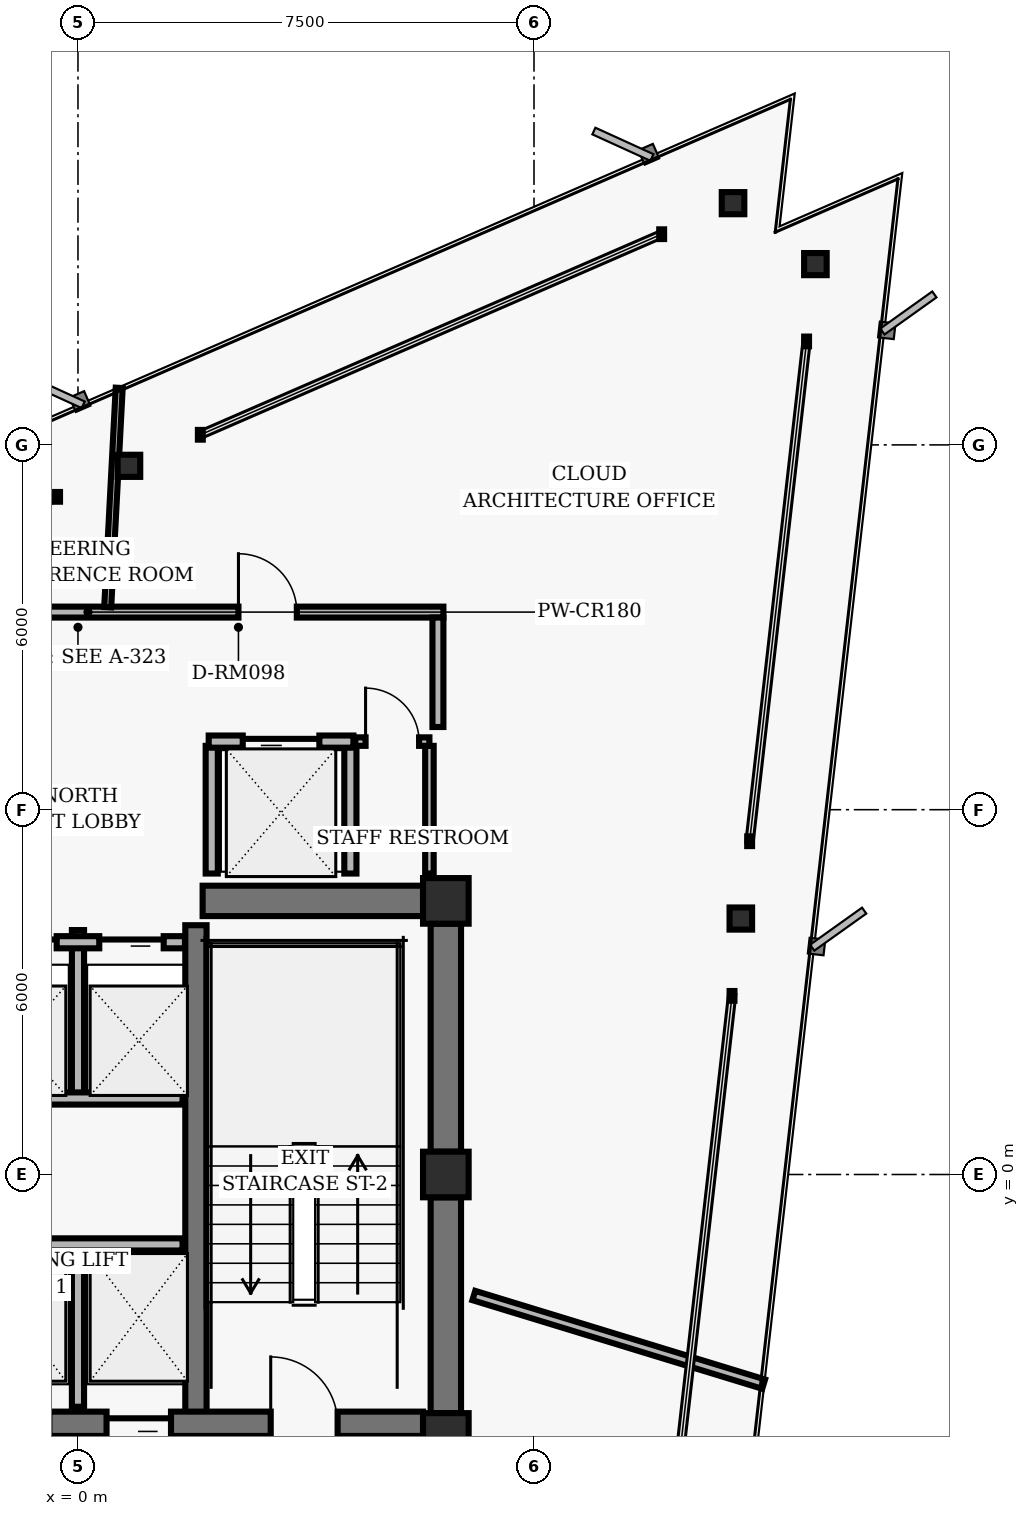
"""IFC4 building model, lengths in metres.
Left out: names, types, materials, properties, quantities, classifications, styles, units other than length and angle.
Written with IfcOpenShell. Run it as: python <this file> out.ifc"""

import sys

from ifc_helpers import new_model, si_unit, direction, frame, frame_2d, origin, origin_2d, place, context, subcontext, project, spatial, rectangle, hollow_rectangle, i_section, extrude, element, fill, save


model = new_model("IFC4")
c1 = context("Model", 3, precision=1e-05, world=origin(), true_north=direction((0.0, 1.0)))
c2 = subcontext(c1, "Body", "Model", "MODEL_VIEW")
j1 = project(units=[si_unit("LENGTHUNIT", "METRE"), si_unit("PLANEANGLEUNIT", "RADIAN")], contexts=[c1])
p1 = place(None, origin())
s1 = spatial("IfcSite", under=j1, at=p1, CompositionType="ELEMENT")
p2 = place(p1, origin())
s2 = spatial("IfcBuilding", under=s1, at=p2, CompositionType="ELEMENT")
p3 = place(p2, frame((0.0, 0.0, 230.08)))
s3 = spatial("IfcBuildingStorey", under=s2, at=p3, CompositionType="ELEMENT", Elevation=230.08)
for number, where, z_axis, x_axis in (
    (1, (6.05, 4.5, 0.0), (0.0, 0.0, 1.0), (1.0, 0.0, 0.0)),
    (2, (6.05, 0.0, 0.0), (0.0, 0.0, 1.0), (1.0, 0.0, 0.0)),
    (3, (6.05, -4.3, 0.0), (0.0, 0.0, 1.0), (1.0, 0.0, 0.0)),
):
    element("IfcColumn", number, at=place(p3, frame(where, z_axis=z_axis, x_axis=x_axis)), inside=s3, PredefinedType="COLUMN", context=c2, shape_type="SweptSolid", body=[
        extrude(hollow_rectangle(XDim=0.75, YDim=0.75, WallThickness=0.05, InnerFilletRadius=0.02, OuterFilletRadius=0.04, at=origin_2d()), origin(), (0.0, 0.0, 1.0), 3.04),
    ])
p4 = place(p3, frame((6.05, 0.375, 0.0), z_axis=(0.0, 0.0, 1.0), x_axis=(0.0, 1.0, 0.0)))
e4 = element("IfcWall", 4, at=p4, inside=s3, PredefinedType="SHEAR", context=c2, shape_type="SweptSolid", body=[
    extrude(rectangle(XDim=3.75, YDim=0.5, at=frame_2d((1.875, 0.0))), origin(), (0.0, 0.0, 1.0), 2.798),
])
p5 = place(p3, frame((6.05, -3.925, 0.0), z_axis=(0.0, 0.0, 1.0), x_axis=(0.0, 1.0, 0.0)))
e5 = element("IfcWall", 5, at=p5, inside=s3, PredefinedType="SHEAR", context=c2, shape_type="SweptSolid", body=[
    extrude(rectangle(XDim=3.55, YDim=0.5, at=frame_2d((1.775, 0.0))), origin(), (0.0, 0.0, 1.0), 2.798),
])
p6 = place(p3, frame((1.94, -4.1, 0.0), z_axis=(0.0, 0.0, 1.0), x_axis=(0.0, 1.0, 0.0)))
e6 = element("IfcWall", 6, at=p6, inside=s3, PredefinedType="SHEAR", context=c2, shape_type="SweptSolid", body=[
    extrude(rectangle(XDim=8.2, YDim=0.35, at=frame_2d((4.1, 0.0))), origin(), (0.0, 0.0, 1.0), 2.798),
])
p7 = place(p3, frame((-5.675, -4.1, 0.0), z_axis=(0.0, 0.0, 1.0), x_axis=(1.0, 0.0, 0.0)))
e7 = element("IfcWall", 7, at=p7, inside=s3, PredefinedType="SHEAR", context=c2, shape_type="SweptSolid", body=[
    extrude(rectangle(XDim=11.35, YDim=0.4, at=frame_2d((5.675, 0.0))), origin(), (0.0, 0.0, 1.0), 2.798),
])
p8 = place(p7, frame((1.405, 0.0, 0.0)))
e8 = element("IfcOpeningElement", 8, at=p8, cuts=e7, PredefinedType="OPENING", context=c2, shape_type="SweptSolid", body=[
    extrude(rectangle(XDim=1.1, YDim=2.04, at=frame_2d((0.55, 1.02))), frame((0.0, 0.21, 0.0), z_axis=(0.0, -1.0, 0.0), x_axis=(1.0, 0.0, 0.0)), (0.0, 0.0, 1.0), 0.42),
])
p9 = place(p7, frame((8.845, 0.0, 0.0)))
e9 = element("IfcOpeningElement", 9, at=p9, cuts=e7, PredefinedType="OPENING", context=c2, shape_type="SweptSolid", body=[
    extrude(rectangle(XDim=1.1, YDim=2.04, at=frame_2d((0.55, 1.02))), frame((0.0, 0.21, 0.0), z_axis=(0.0, -1.0, 0.0), x_axis=(1.0, 0.0, 0.0)), (0.0, 0.0, 1.0), 0.42),
])
p10 = place(p7, frame((4.145, 0.0, 0.0)))
e10 = element("IfcOpeningElement", 10, at=p10, cuts=e7, PredefinedType="OPENING", context=c2, shape_type="SweptSolid", body=[
    extrude(rectangle(XDim=1.06, YDim=2.04, at=frame_2d((0.53, 1.02))), frame((0.0, 0.21, 0.0), z_axis=(0.0, -1.0, 0.0), x_axis=(1.0, 0.0, 0.0)), (0.0, 0.0, 1.0), 0.42),
])
p11 = place(p7, frame((6.145, 0.0, 0.0)))
e11 = element("IfcOpeningElement", 11, at=p11, cuts=e7, PredefinedType="OPENING", context=c2, shape_type="SweptSolid", body=[
    extrude(rectangle(XDim=1.06, YDim=2.04, at=frame_2d((0.53, 1.02))), frame((0.0, 0.21, 0.0), z_axis=(0.0, -1.0, 0.0), x_axis=(1.0, 0.0, 0.0)), (0.0, 0.0, 1.0), 0.42),
])
p12 = place(p3, frame((2.05, 4.5, 0.0), z_axis=(0.0, 0.0, 1.0), x_axis=(1.0, 0.0, 0.0)))
e12 = element("IfcWall", 12, at=p12, inside=s3, PredefinedType="SHEAR", context=c2, shape_type="SweptSolid", body=[
    extrude(rectangle(XDim=3.625, YDim=0.5, at=frame_2d((1.812, 0.0))), origin(), (0.0, 0.0, 1.0), 2.798),
])
for number, where, z_axis, x_axis in (
    (13, (10.901, 4.21, 0.0), (0.0, 0.0, 1.0), (1.0, 0.0, 0.0)),
    (14, (12.128, 14.973, 0.0), (0.0, 0.0, 1.0), (1.0, 0.0, 0.0)),
    (15, (10.773, 15.976, 0.0), (0.0, 0.0, 1.0), (1.0, 0.0, 0.0)),
    (16, (0.838, 11.656, 0.0), (0.0, 0.0, 1.0), (1.0, 0.0, 0.0)),
):
    element("IfcColumn", number, at=place(p3, frame(where, z_axis=z_axis, x_axis=x_axis)), inside=s3, PredefinedType="COLUMN", context=c2, shape_type="SweptSolid", body=[
        extrude(i_section(OverallWidth=0.371, OverallDepth=0.364, WebThickness=0.013, FlangeThickness=0.022, FilletRadius=0.015, at=origin_2d()), origin(), (0.0, 0.0, 1.0), 3.04),
    ])
p13 = place(p3, frame((0.0, -3.82, 0.0), z_axis=(0.0, 0.0, 1.0), x_axis=(0.0, 1.0, 0.0)))
e17 = element("IfcWall", 17, at=p13, inside=s3, PredefinedType="PARTITIONING", context=c2, shape_type="SweptSolid", body=[
    extrude(rectangle(XDim=2.67, YDim=0.2, at=frame_2d((1.335, 0.0))), origin(), (0.0, 0.0, 1.0), 2.773),
])
p14 = place(p3, frame((-1.72, -1.15, 0.0), z_axis=(0.0, 0.0, 1.0), x_axis=(1.0, 0.0, 0.0)))
e18 = element("IfcWall", 18, at=p14, inside=s3, PredefinedType="PARTITIONING", context=c2, shape_type="SweptSolid", body=[
    extrude(rectangle(XDim=3.44, YDim=0.2, at=frame_2d((1.72, 0.0))), origin(), (0.0, 0.0, 1.0), 2.773),
])
p15 = place(p3, frame((0.0, 1.25, 0.0), z_axis=(0.0, 0.0, 1.0), x_axis=(0.0, 1.0, 0.0)))
e19 = element("IfcWall", 19, at=p15, inside=s3, PredefinedType="PARTITIONING", context=c2, shape_type="SweptSolid", body=[
    extrude(rectangle(XDim=2.77, YDim=0.2, at=frame_2d((1.385, 0.0))), origin(), (0.0, 0.0, 1.0), 2.773),
])
p16 = place(p3, frame((-1.72, 1.25, 0.0), z_axis=(0.0, 0.0, 1.0), x_axis=(1.0, 0.0, 0.0)))
e20 = element("IfcWall", 20, at=p16, inside=s3, PredefinedType="PARTITIONING", context=c2, shape_type="SweptSolid", body=[
    extrude(rectangle(XDim=3.44, YDim=0.2, at=frame_2d((1.72, 0.0))), origin(), (0.0, 0.0, 1.0), 2.773),
])
p17 = place(p3, frame((-1.76, 3.82, 0.0), z_axis=(0.0, 0.0, 1.0), x_axis=(1.0, 0.0, 0.0)))
e21 = element("IfcWall", 21, at=p17, inside=s3, PredefinedType="PARTITIONING", context=c2, shape_type="SweptSolid", body=[
    extrude(rectangle(XDim=3.52, YDim=0.2, at=frame_2d((1.76, 0.0))), origin(), (0.0, 0.0, 1.0), 2.773),
])
p18 = place(p17, frame((0.35, 0.0, 0.0)))
e22 = element("IfcOpeningElement", 22, at=p18, cuts=e21, PredefinedType="OPENING", context=c2, shape_type="SweptSolid", body=[
    extrude(rectangle(XDim=1.06, YDim=2.04, at=frame_2d((0.53, 1.02))), frame((0.0, 0.11, 0.0), z_axis=(0.0, -1.0, 0.0), x_axis=(1.0, 0.0, 0.0)), (0.0, 0.0, 1.0), 0.22),
])
p19 = place(p17, frame((2.11, 0.0, 0.0)))
e23 = element("IfcOpeningElement", 23, at=p19, cuts=e21, PredefinedType="OPENING", context=c2, shape_type="SweptSolid", body=[
    extrude(rectangle(XDim=1.06, YDim=2.04, at=frame_2d((0.53, 1.02))), frame((0.0, 0.11, 0.0), z_axis=(0.0, -1.0, 0.0), x_axis=(1.0, 0.0, 0.0)), (0.0, 0.0, 1.0), 0.22),
])
for number, where, z_axis, x_axis in (
    (24, (2.2, 4.95, 0.0), (0.0, 0.0, 1.0), (0.0, 1.0, 0.0)),
    (25, (4.48, 4.95, 0.0), (0.0, 0.0, 1.0), (0.0, 1.0, 0.0)),
):
    element("IfcWall", number, at=place(p3, frame(where, z_axis=z_axis, x_axis=x_axis)), inside=s3, PredefinedType="PARTITIONING", context=c2, shape_type="SweptSolid", body=[
        extrude(rectangle(XDim=2.1, YDim=0.2, at=frame_2d((1.05, 0.0))), origin(), (0.0, 0.0, 1.0), 2.773),
    ])
p20 = place(p3, frame((2.15, 7.12, 0.0), z_axis=(0.0, 0.0, 1.0), x_axis=(1.0, 0.0, 0.0)))
e26 = element("IfcWall", 26, at=p20, inside=s3, PredefinedType="PARTITIONING", context=c2, shape_type="SweptSolid", body=[
    extrude(rectangle(XDim=2.38, YDim=0.2, at=frame_2d((1.19, 0.0))), origin(), (0.0, 0.0, 1.0), 2.395),
])
p21 = place(p20, frame((0.56, 0.0, 0.0)))
e27 = element("IfcOpeningElement", 27, at=p21, cuts=e26, PredefinedType="OPENING", context=c2, shape_type="SweptSolid", body=[
    extrude(rectangle(XDim=1.26, YDim=2.06, at=frame_2d((0.63, 1.03))), frame((0.0, 0.11, 0.0), z_axis=(0.0, -1.0, 0.0), x_axis=(1.0, 0.0, 0.0)), (0.0, 0.0, 1.0), 0.22),
])
p22 = place(p3, frame((5.78, 4.95, 0.0), z_axis=(0.0, 0.0, 1.0), x_axis=(0.0, 1.0, 0.0)))
e28 = element("IfcWall", 28, at=p22, inside=s3, PredefinedType="PARTITIONING", context=c2, shape_type="SweptSolid", body=[
    extrude(rectangle(XDim=2.1, YDim=0.14, at=frame_2d((1.05, 0.0))), origin(), (0.0, 0.0, 1.0), 2.773),
])
p23 = place(p3, frame((4.56, 7.12, 0.0), z_axis=(0.0, 0.0, 1.0), x_axis=(1.0, 0.0, 0.0)))
e29 = element("IfcWall", 29, at=p23, inside=s3, PredefinedType="PARTITIONING", context=c2, shape_type="SweptSolid", body=[
    extrude(rectangle(XDim=1.22, YDim=0.14, at=frame_2d((0.61, 0.0))), origin(), (0.0, 0.0, 1.0), 2.773),
])
p24 = place(p23, frame((0.17, 0.0, 0.0)))
e30 = element("IfcOpeningElement", 30, at=p24, cuts=e29, PredefinedType="OPENING", context=c2, shape_type="SweptSolid", body=[
    extrude(rectangle(XDim=0.88, YDim=2.02, at=frame_2d((0.44, 1.01))), frame((0.0, 0.08, 0.0), z_axis=(0.0, -1.0, 0.0), x_axis=(1.0, 0.0, 0.0)), (0.0, 0.0, 1.0), 0.16),
])
p25 = place(p3, frame((-7.29, 9.25, 0.0), z_axis=(0.0, 0.0, 1.0), x_axis=(1.0, 0.0, 0.0)))
e31 = element("IfcWall", 31, at=p25, inside=s3, PredefinedType="PARTITIONING", context=c2, shape_type="SweptSolid", body=[
    extrude(rectangle(XDim=13.3, YDim=0.18, at=frame_2d((6.65, 0.0))), origin(), (0.0, 0.0, 1.0), 2.395),
])
p26 = place(p25, frame((9.929, 0.0, 0.0)))
e32 = element("IfcOpeningElement", 32, at=p26, cuts=e31, PredefinedType="OPENING", context=c2, shape_type="SweptSolid", body=[
    extrude(rectangle(XDim=0.96, YDim=2.02, at=frame_2d((0.48, 1.01))), frame((0.0, 0.1, 0.0), z_axis=(0.0, -1.0, 0.0), x_axis=(1.0, 0.0, 0.0)), (0.0, 0.0, 1.0), 0.2),
])
p27 = place(p25, frame((4.02, 0.0, 0.0)))
e33 = element("IfcOpeningElement", 33, at=p27, cuts=e31, PredefinedType="OPENING", context=c2, shape_type="SweptSolid", body=[
    extrude(rectangle(XDim=0.96, YDim=2.02, at=frame_2d((0.48, 1.01))), frame((0.0, 0.1, 0.0), z_axis=(0.0, -1.0, 0.0), x_axis=(1.0, 0.0, 0.0)), (0.0, 0.0, 1.0), 0.2),
])
p28 = place(p3, frame((5.92, 9.16, 0.0), z_axis=(0.0, 0.0, 1.0), x_axis=(0.0, -1.0, 0.0)))
e34 = element("IfcWall", 34, at=p28, inside=s3, PredefinedType="PARTITIONING", context=c2, shape_type="SweptSolid", body=[
    extrude(rectangle(XDim=1.8, YDim=0.18, at=frame_2d((0.9, 0.0))), origin(), (0.0, 0.0, 1.0), 2.773),
])
p29 = place(p3, frame((6.51, -1.99, 0.0), z_axis=(0.0, 0.0, 1.0), x_axis=(0.956296423481, -0.292398957653, 0.0)))
e35 = element("IfcWall", 35, at=p29, inside=s3, PredefinedType="PARTITIONING", context=c2, shape_type="SweptSolid", body=[
    extrude(rectangle(XDim=4.985, YDim=0.16, at=frame_2d((2.492, 0.0))), origin(), (0.0, 0.0, 1.0), 2.773),
])
p30 = place(p3, frame((0.489, 9.33, 0.0), z_axis=(0.0, 0.0, 1.0), x_axis=(0.05229993373, 0.998631421963, 0.0)))
e36 = element("IfcWall", 36, at=p30, inside=s3, PredefinedType="MOVABLE", context=c2, shape_type="SweptSolid", body=[
    extrude(rectangle(XDim=3.613, YDim=0.115, at=frame_2d((1.807, 0.0))), origin(), (0.0, 0.0, 1.0), 2.773),
])
p31 = place(p9, origin())
e37 = element("IfcDoor", 37, at=p31, inside=s3, OperationType="SINGLE_SWING_LEFT", PredefinedType="DOOR", context=c2, shape_type="SweptSolid", body=[
    extrude(rectangle(XDim=1.1, YDim=2.04, at=frame_2d((0.55, 1.02))), frame((0.0, 0.025, 0.0), z_axis=(0.0, -1.0, 0.0), x_axis=(1.0, 0.0, 0.0)), (0.0, 0.0, 1.0), 0.05),
])
fill(e9, e37)
p32 = place(p11, origin())
e38 = element("IfcDoor", 38, at=p32, inside=s3, OperationType="SLIDING_TO_RIGHT", PredefinedType="DOOR", context=c2, shape_type="SweptSolid", body=[
    extrude(rectangle(XDim=1.06, YDim=2.04, at=frame_2d((0.53, 1.02))), frame((0.0, 0.025, 0.0), z_axis=(0.0, -1.0, 0.0), x_axis=(1.0, 0.0, 0.0)), (0.0, 0.0, 1.0), 0.05),
])
fill(e11, e38)
p33 = place(p18, origin())
e39 = element("IfcDoor", 39, at=p33, inside=s3, OperationType="SLIDING_TO_LEFT", PredefinedType="DOOR", context=c2, shape_type="SweptSolid", body=[
    extrude(rectangle(XDim=1.06, YDim=2.04, at=frame_2d((0.53, 1.02))), frame((0.0, 0.025, 0.0), z_axis=(0.0, -1.0, 0.0), x_axis=(1.0, 0.0, 0.0)), (0.0, 0.0, 1.0), 0.05),
])
fill(e22, e39)
p34 = place(p19, origin())
e40 = element("IfcDoor", 40, at=p34, inside=s3, OperationType="SLIDING_TO_RIGHT", PredefinedType="DOOR", context=c2, shape_type="SweptSolid", body=[
    extrude(rectangle(XDim=1.06, YDim=2.04, at=frame_2d((0.53, 1.02))), frame((0.0, 0.025, 0.0), z_axis=(0.0, -1.0, 0.0), x_axis=(1.0, 0.0, 0.0)), (0.0, 0.0, 1.0), 0.05),
])
fill(e23, e40)
p35 = place(p21, origin())
e41 = element("IfcDoor", 41, at=p35, inside=s3, OperationType="SLIDING_TO_LEFT", PredefinedType="DOOR", context=c2, shape_type="SweptSolid", body=[
    extrude(rectangle(XDim=1.26, YDim=2.06, at=frame_2d((0.63, 1.03))), frame((0.0, 0.025, 0.0), z_axis=(0.0, -1.0, 0.0), x_axis=(1.0, 0.0, 0.0)), (0.0, 0.0, 1.0), 0.05),
])
fill(e27, e41)
p36 = place(p24, origin())
e42 = element("IfcDoor", 42, at=p36, inside=s3, OperationType="SINGLE_SWING_LEFT", PredefinedType="DOOR", context=c2, shape_type="SweptSolid", body=[
    extrude(rectangle(XDim=0.88, YDim=2.02, at=frame_2d((0.44, 1.01))), frame((0.0, 0.025, 0.0), z_axis=(0.0, -1.0, 0.0), x_axis=(1.0, 0.0, 0.0)), (0.0, 0.0, 1.0), 0.05),
])
fill(e30, e42)
p37 = place(p26, origin())
e43 = element("IfcDoor", 43, at=p37, inside=s3, OperationType="SINGLE_SWING_LEFT", PredefinedType="DOOR", context=c2, shape_type="SweptSolid", body=[
    extrude(rectangle(XDim=0.96, YDim=2.02, at=frame_2d((0.48, 1.01))), frame((0.0, 0.025, 0.0), z_axis=(0.0, -1.0, 0.0), x_axis=(1.0, 0.0, 0.0)), (0.0, 0.0, 1.0), 0.05),
])
fill(e32, e43)
save(model, sys.argv[1])
